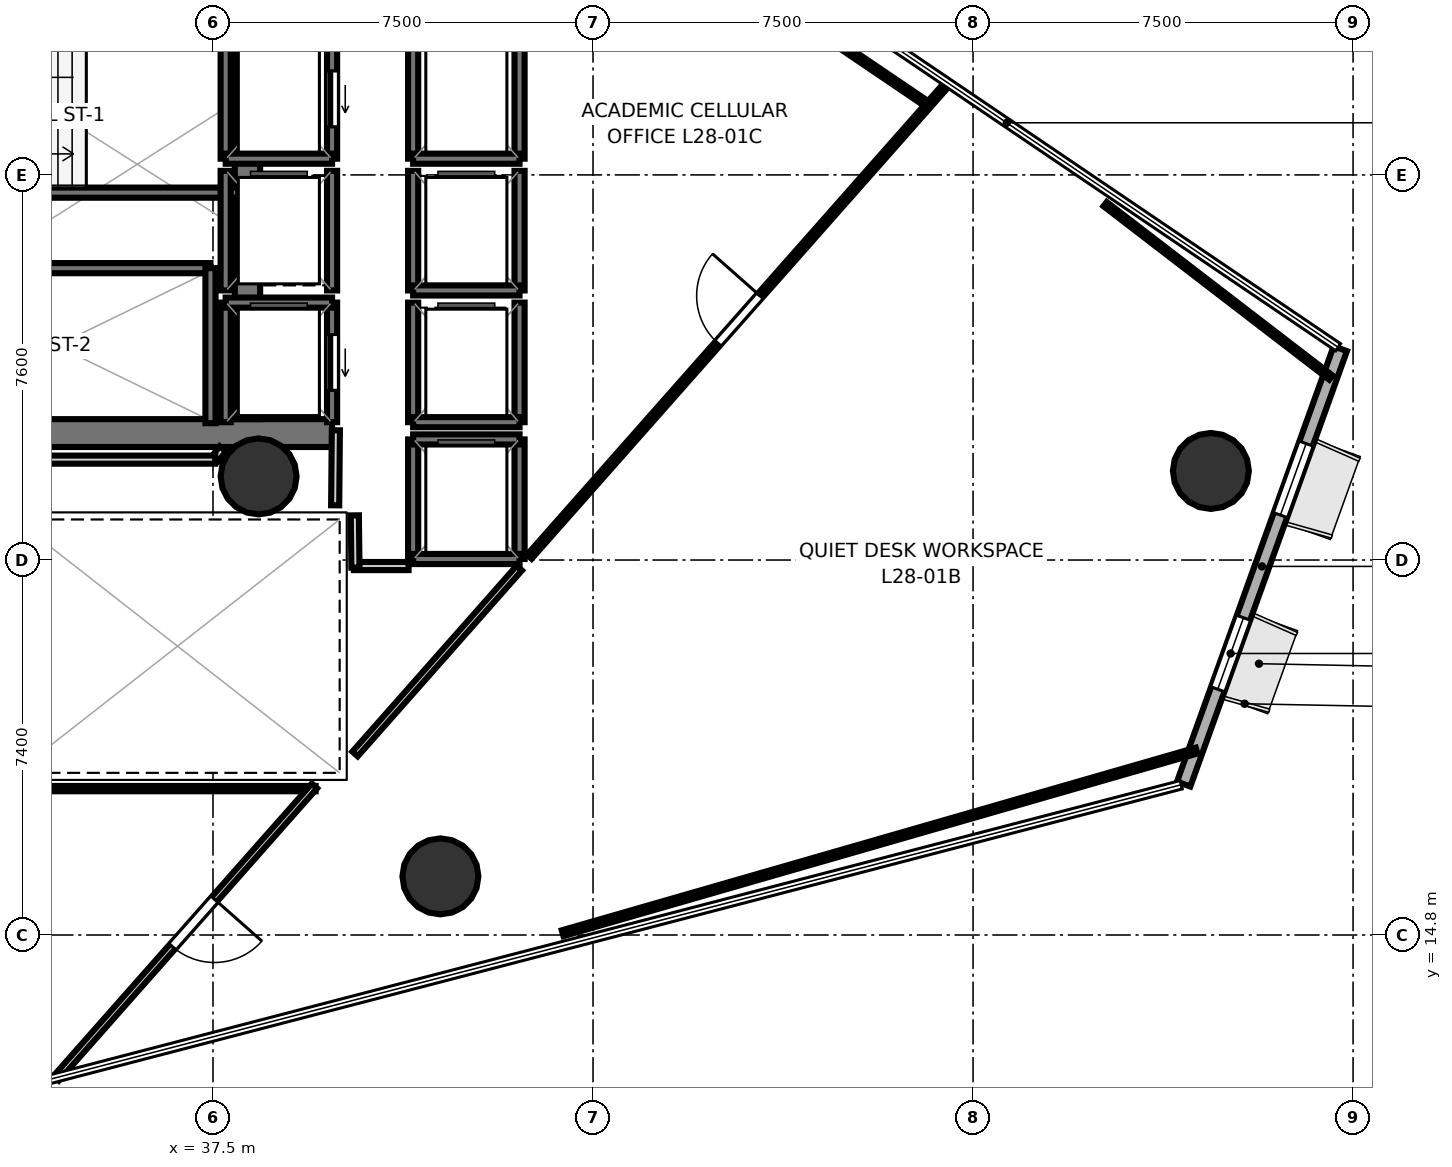
"""IFC4 building model, lengths in metres.
Left out: names, types, materials, properties, quantities, classifications, styles, units other than length and angle.
Written with IfcOpenShell. Run it as: python <this file> out.ifc"""

import sys

from ifc_helpers import new_model, si_unit, direction, frame, frame_2d, origin, origin_2d, place, context, subcontext, project, spatial, rectangle, hollow_circle, extrude, element, fill, save


model = new_model("IFC4")
c1 = context("Model", 3, precision=1e-05, world=origin(), true_north=direction((0.0, 1.0)))
c2 = subcontext(c1, "Body", "Model", "MODEL_VIEW")
j1 = project(units=[si_unit("LENGTHUNIT", "METRE"), si_unit("PLANEANGLEUNIT", "RADIAN")], contexts=[c1])
p1 = place(None, origin())
s1 = spatial("IfcSite", under=j1, at=p1, CompositionType="ELEMENT")
p2 = place(p1, origin())
s2 = spatial("IfcBuilding", under=s1, at=p2, CompositionType="ELEMENT")
p3 = place(p2, frame((0.0, 0.0, 112.6)))
s3 = spatial("IfcBuildingStorey", under=s2, at=p3, CompositionType="ELEMENT", Elevation=112.6)
p4 = place(p3, frame((29.23, 24.705, 0.0), z_axis=(0.0, 0.0, 1.0), x_axis=(1.0, 0.0, 0.0)))
e1 = element("IfcWall", 1, at=p4, inside=s3, PredefinedType="SHEAR", context=c2, shape_type="SweptSolid", body=[
    extrude(rectangle(XDim=10.62, YDim=0.55, at=frame_2d((5.31, 0.0))), origin(), (0.0, 0.0, 1.0), 3.52),
])
p5 = place(p4, frame((0.795, 0.0, 0.0)))
e2 = element("IfcOpeningElement", 2, at=p5, cuts=e1, PredefinedType="OPENING", context=c2, shape_type="SweptSolid", body=[
    extrude(rectangle(XDim=1.25, YDim=2.15, at=frame_2d((0.625, 1.075))), frame((0.0, 0.285, 0.0), z_axis=(0.0, -1.0, 0.0), x_axis=(1.0, 0.0, 0.0)), (0.0, 0.0, 1.0), 0.57),
])
p6 = place(p3, frame((38.18, 24.98, 0.0), z_axis=(0.0, 0.0, 1.0), x_axis=(0.0, 1.0, 0.0)))
e3 = element("IfcWall", 3, at=p6, inside=s3, PredefinedType="SHEAR", context=c2, shape_type="SweptSolid", body=[
    extrude(rectangle(XDim=7.44, YDim=0.5, at=frame_2d((3.72, 0.0))), origin(), (0.0, 0.0, 1.0), 3.52),
])
for number, where, z_axis, x_axis in (
    (4, (38.4, 23.85, 0.0), (0.0, 0.0, 1.0), (1.0, 0.0, 0.0)),
    (5, (57.194, 23.958, 0.0), (0.0, 0.0, 1.0), (1.0, 0.0, 0.0)),
    (6, (41.988, 15.957, 0.0), (0.0, 0.0, 1.0), (1.0, 0.0, 0.0)),
):
    element("IfcColumn", number, at=place(p3, frame(where, z_axis=z_axis, x_axis=x_axis)), inside=s3, PredefinedType="COLUMN", context=c2, shape_type="SweptSolid", body=[
        extrude(hollow_circle(Radius=0.75, WallThickness=0.036, at=origin_2d()), origin(), (0.0, 0.0, 1.0), 3.7),
    ])
p7 = place(p3, frame((56.656, 17.778, 0.0), z_axis=(0.0, 0.0, 1.0), x_axis=(0.338454364394, 0.940982807081, 0.0)))
e7 = element("IfcWall", 7, at=p7, inside=s3, PredefinedType="SOLIDWALL", context=c2, shape_type="SweptSolid", body=[
    extrude(rectangle(XDim=9.131, YDim=0.28, at=frame_2d((4.566, 0.0))), origin(), (0.0, 0.0, 1.0), 3.52),
])
p8 = place(p7, frame((1.99, 0.0, 0.85)))
e8 = element("IfcOpeningElement", 8, at=p8, cuts=e7, PredefinedType="OPENING", context=c2, shape_type="SweptSolid", body=[
    extrude(rectangle(XDim=1.5, YDim=2.1, at=frame_2d((0.75, 1.05))), frame((0.0, 0.15, 0.0), z_axis=(0.0, -1.0, 0.0), x_axis=(1.0, 0.0, 0.0)), (0.0, 0.0, 1.0), 0.3),
])
p9 = place(p7, frame((5.642, 0.0, 0.85)))
e9 = element("IfcOpeningElement", 9, at=p9, cuts=e7, PredefinedType="OPENING", context=c2, shape_type="SweptSolid", body=[
    extrude(rectangle(XDim=1.5, YDim=2.1, at=frame_2d((0.75, 1.05))), frame((0.0, 0.15, 0.0), z_axis=(0.0, -1.0, 0.0), x_axis=(1.0, 0.0, 0.0)), (0.0, 0.0, 1.0), 0.3),
])
p10 = place(p3, frame((29.7, 29.45, 0.0), z_axis=(0.0, 0.0, 1.0), x_axis=(1.0, 0.0, 0.0)))
e10 = element("IfcWall", 10, at=p10, inside=s3, PredefinedType="SOLIDWALL", context=c2, shape_type="SweptSolid", body=[
    extrude(rectangle(XDim=8.3, YDim=0.2, at=frame_2d((4.15, 0.0))), origin(), (0.0, 0.0, 1.0), 3.52),
])
p11 = place(p3, frame((29.7, 27.96, 0.0), z_axis=(0.0, 0.0, 1.0), x_axis=(1.0, 0.0, 0.0)))
e11 = element("IfcWall", 11, at=p11, inside=s3, PredefinedType="SOLIDWALL", context=c2, shape_type="SweptSolid", body=[
    extrude(rectangle(XDim=7.75, YDim=0.2, at=frame_2d((3.875, 0.0))), origin(), (0.0, 0.0, 1.0), 3.52),
])
p12 = place(p3, frame((37.45, 24.9, 0.0), z_axis=(0.0, 0.0, 1.0), x_axis=(0.0, 1.0, 0.0)))
e12 = element("IfcWall", 12, at=p12, inside=s3, PredefinedType="SOLIDWALL", context=c2, shape_type="SweptSolid", body=[
    extrude(rectangle(XDim=3.06, YDim=0.2, at=frame_2d((1.53, 0.0))), origin(), (0.0, 0.0, 1.0), 3.52),
])
p13 = place(p3, frame((39.85, 30.12, 0.0), z_axis=(0.0, 0.0, 1.0), x_axis=(0.0, 1.0, 0.0)))
e13 = element("IfcWall", 13, at=p13, inside=s3, PredefinedType="SOLIDWALL", context=c2, shape_type="SweptSolid", body=[
    extrude(rectangle(XDim=2.36, YDim=0.2, at=frame_2d((1.18, 0.0))), origin(), (0.0, 0.0, 1.0), 3.52),
])
p14 = place(p13, frame((0.63, 0.0, 0.0)))
e14 = element("IfcOpeningElement", 14, at=p14, cuts=e13, PredefinedType="OPENING", context=c2, shape_type="SweptSolid", body=[
    extrude(rectangle(XDim=1.1, YDim=2.15, at=frame_2d((0.55, 1.075))), frame((0.0, 0.11, 0.0), z_axis=(0.0, -1.0, 0.0), x_axis=(1.0, 0.0, 0.0)), (0.0, 0.0, 1.0), 0.22),
])
p15 = place(p3, frame((37.75, 30.12, 0.0), z_axis=(0.0, 0.0, 1.0), x_axis=(0.0, 1.0, 0.0)))
e15 = element("IfcWall", 15, at=p15, inside=s3, PredefinedType="SOLIDWALL", context=c2, shape_type="SweptSolid", body=[
    extrude(rectangle(XDim=2.36, YDim=0.2, at=frame_2d((1.18, 0.0))), origin(), (0.0, 0.0, 1.0), 3.52),
])
p16 = place(p3, frame((37.75, 30.12, 0.0), z_axis=(0.0, 0.0, 1.0), x_axis=(1.0, 0.0, 0.0)))
e16 = element("IfcWall", 16, at=p16, inside=s3, PredefinedType="SOLIDWALL", context=c2, shape_type="SweptSolid", body=[
    extrude(rectangle(XDim=2.1, YDim=0.2, at=frame_2d((1.05, 0.0))), origin(), (0.0, 0.0, 1.0), 3.52),
])
p17 = place(p3, frame((39.85, 24.92, 0.0), z_axis=(0.0, 0.0, 1.0), x_axis=(0.0, 1.0, 0.0)))
e17 = element("IfcWall", 17, at=p17, inside=s3, PredefinedType="SOLIDWALL", context=c2, shape_type="SweptSolid", body=[
    extrude(rectangle(XDim=2.36, YDim=0.2, at=frame_2d((1.18, 0.0))), origin(), (0.0, 0.0, 1.0), 3.52),
])
p18 = place(p17, frame((0.63, 0.0, 0.0)))
e18 = element("IfcOpeningElement", 18, at=p18, cuts=e17, PredefinedType="OPENING", context=c2, shape_type="SweptSolid", body=[
    extrude(rectangle(XDim=1.1, YDim=2.15, at=frame_2d((0.55, 1.075))), frame((0.0, 0.11, 0.0), z_axis=(0.0, -1.0, 0.0), x_axis=(1.0, 0.0, 0.0)), (0.0, 0.0, 1.0), 0.22),
])
p19 = place(p3, frame((37.75, 24.92, 0.0), z_axis=(0.0, 0.0, 1.0), x_axis=(0.0, 1.0, 0.0)))
e19 = element("IfcWall", 19, at=p19, inside=s3, PredefinedType="SOLIDWALL", context=c2, shape_type="SweptSolid", body=[
    extrude(rectangle(XDim=2.36, YDim=0.2, at=frame_2d((1.18, 0.0))), origin(), (0.0, 0.0, 1.0), 3.52),
])
p20 = place(p3, frame((37.75, 27.28, 0.0), z_axis=(0.0, 0.0, 1.0), x_axis=(1.0, 0.0, 0.0)))
e20 = element("IfcWall", 20, at=p20, inside=s3, PredefinedType="SOLIDWALL", context=c2, shape_type="SweptSolid", body=[
    extrude(rectangle(XDim=2.1, YDim=0.2, at=frame_2d((1.05, 0.0))), origin(), (0.0, 0.0, 1.0), 3.52),
])
for number, where, z_axis, x_axis in (
    (21, (43.55, 30.12, 0.0), (0.0, 0.0, 1.0), (0.0, 1.0, 0.0)),
    (22, (41.45, 30.12, 0.0), (0.0, 0.0, 1.0), (0.0, 1.0, 0.0)),
):
    element("IfcWall", number, at=place(p3, frame(where, z_axis=z_axis, x_axis=x_axis)), inside=s3, PredefinedType="SOLIDWALL", context=c2, shape_type="SweptSolid", body=[
        extrude(rectangle(XDim=2.36, YDim=0.2, at=frame_2d((1.18, 0.0))), origin(), (0.0, 0.0, 1.0), 3.52),
    ])
p21 = place(p3, frame((41.45, 30.12, 0.0), z_axis=(0.0, 0.0, 1.0), x_axis=(1.0, 0.0, 0.0)))
e23 = element("IfcWall", 23, at=p21, inside=s3, PredefinedType="SOLIDWALL", context=c2, shape_type="SweptSolid", body=[
    extrude(rectangle(XDim=2.1, YDim=0.2, at=frame_2d((1.05, 0.0))), origin(), (0.0, 0.0, 1.0), 3.52),
])
for number, where, z_axis, x_axis in (
    (24, (43.55, 27.52, 0.0), (0.0, 0.0, 1.0), (0.0, 1.0, 0.0)),
    (25, (41.45, 27.52, 0.0), (0.0, 0.0, 1.0), (0.0, 1.0, 0.0)),
):
    element("IfcWall", number, at=place(p3, frame(where, z_axis=z_axis, x_axis=x_axis)), inside=s3, PredefinedType="SOLIDWALL", context=c2, shape_type="SweptSolid", body=[
        extrude(rectangle(XDim=2.36, YDim=0.2, at=frame_2d((1.18, 0.0))), origin(), (0.0, 0.0, 1.0), 3.52),
    ])
p22 = place(p3, frame((41.45, 27.52, 0.0), z_axis=(0.0, 0.0, 1.0), x_axis=(1.0, 0.0, 0.0)))
e26 = element("IfcWall", 26, at=p22, inside=s3, PredefinedType="SOLIDWALL", context=c2, shape_type="SweptSolid", body=[
    extrude(rectangle(XDim=2.1, YDim=0.2, at=frame_2d((1.05, 0.0))), origin(), (0.0, 0.0, 1.0), 3.52),
])
for number, where, z_axis, x_axis in (
    (27, (43.55, 24.92, 0.0), (0.0, 0.0, 1.0), (0.0, 1.0, 0.0)),
    (28, (41.45, 24.92, 0.0), (0.0, 0.0, 1.0), (0.0, 1.0, 0.0)),
):
    element("IfcWall", number, at=place(p3, frame(where, z_axis=z_axis, x_axis=x_axis)), inside=s3, PredefinedType="SOLIDWALL", context=c2, shape_type="SweptSolid", body=[
        extrude(rectangle(XDim=2.36, YDim=0.2, at=frame_2d((1.18, 0.0))), origin(), (0.0, 0.0, 1.0), 3.52),
    ])
p23 = place(p3, frame((41.45, 24.92, 0.0), z_axis=(0.0, 0.0, 1.0), x_axis=(1.0, 0.0, 0.0)))
e29 = element("IfcWall", 29, at=p23, inside=s3, PredefinedType="SOLIDWALL", context=c2, shape_type="SweptSolid", body=[
    extrude(rectangle(XDim=2.1, YDim=0.2, at=frame_2d((1.05, 0.0))), origin(), (0.0, 0.0, 1.0), 3.52),
])
for number, where, z_axis, x_axis in (
    (30, (39.85, 27.52, 0.0), (0.0, 0.0, 1.0), (0.0, 1.0, 0.0)),
    (31, (37.75, 27.52, 0.0), (0.0, 0.0, 1.0), (0.0, 1.0, 0.0)),
):
    element("IfcWall", number, at=place(p3, frame(where, z_axis=z_axis, x_axis=x_axis)), inside=s3, PredefinedType="SOLIDWALL", context=c2, shape_type="SweptSolid", body=[
        extrude(rectangle(XDim=2.36, YDim=0.2, at=frame_2d((1.18, 0.0))), origin(), (0.0, 0.0, 1.0), 3.52),
    ])
for number, where, z_axis, x_axis in (
    (32, (43.55, 22.22, 0.0), (0.0, 0.0, 1.0), (0.0, 1.0, 0.0)),
    (33, (41.45, 22.22, 0.0), (0.0, 0.0, 1.0), (0.0, 1.0, 0.0)),
):
    element("IfcWall", number, at=place(p3, frame(where, z_axis=z_axis, x_axis=x_axis)), inside=s3, PredefinedType="SOLIDWALL", context=c2, shape_type="SweptSolid", body=[
        extrude(rectangle(XDim=2.36, YDim=0.2, at=frame_2d((1.18, 0.0))), origin(), (0.0, 0.0, 1.0), 3.52),
    ])
for number, where, z_axis, x_axis in (
    (34, (41.45, 24.58, 0.0), (0.0, 0.0, 1.0), (1.0, 0.0, 0.0)),
    (35, (41.45, 22.22, 0.0), (0.0, 0.0, 1.0), (1.0, 0.0, 0.0)),
):
    element("IfcWall", number, at=place(p3, frame(where, z_axis=z_axis, x_axis=x_axis)), inside=s3, PredefinedType="SOLIDWALL", context=c2, shape_type="SweptSolid", body=[
        extrude(rectangle(XDim=2.1, YDim=0.2, at=frame_2d((1.05, 0.0))), origin(), (0.0, 0.0, 1.0), 3.52),
    ])
p24 = place(p3, frame((41.36, 22.081, 0.0), z_axis=(0.0, 0.0, 1.0), x_axis=(-1.0, 0.0, 0.0)))
e36 = element("IfcWall", 36, at=p24, inside=s3, PredefinedType="PARTITIONING", context=c2, shape_type="SweptSolid", body=[
    extrude(rectangle(XDim=1.08, YDim=0.16, at=frame_2d((0.54, 0.0))), origin(), (0.0, 0.0, 1.0), 2.84),
])
p25 = place(p3, frame((40.311, 22.05, 0.0), z_axis=(0.0, 0.0, 1.0), x_axis=(-0.011836292006, 0.999929948642, 0.0)))
e37 = element("IfcWall", 37, at=p25, inside=s3, PredefinedType="PARTITIONING", context=c2, shape_type="SweptSolid", body=[
    extrude(rectangle(XDim=1.031, YDim=0.16, at=frame_2d((0.516, 0.0))), origin(), (0.0, 0.0, 1.0), 2.84),
])
p26 = place(p3, frame((39.911, 23.28, 0.0), z_axis=(0.0, 0.0, 1.0), x_axis=(0.009397771291, 0.999955839972, 0.0)))
e38 = element("IfcWall", 38, at=p26, inside=s3, PredefinedType="PARTITIONING", context=c2, shape_type="SweptSolid", body=[
    extrude(rectangle(XDim=1.481, YDim=0.16, at=frame_2d((0.74, 0.0))), origin(), (0.0, 0.0, 1.0), 2.84),
])
p27 = place(p3, frame((37.694, 24.396, 0.0), z_axis=(0.0, 0.0, 1.0), x_axis=(-0.607118658061, -0.794611184815, 0.0)))
e39 = element("IfcWall", 39, at=p27, inside=s3, PredefinedType="PARTITIONING", context=c2, shape_type="SweptSolid", body=[
    extrude(rectangle(XDim=0.246, YDim=0.16, at=frame_2d((0.123, 0.0))), origin(), (0.0, 0.0, 1.0), 2.84),
])
p28 = place(p3, frame((37.545, 24.181, 0.0), z_axis=(0.0, 0.0, 1.0), x_axis=(-1.0, 0.0, 0.0)))
e40 = element("IfcWall", 40, at=p28, inside=s3, PredefinedType="PARTITIONING", context=c2, shape_type="SweptSolid", body=[
    extrude(rectangle(XDim=4.015, YDim=0.16, at=frame_2d((2.007, 0.0))), origin(), (0.0, 0.0, 1.0), 2.84),
])
p29 = place(p3, frame((33.6, 17.689, 0.0), z_axis=(0.0, 0.0, 1.0), x_axis=(1.0, 0.0, 0.0)))
e41 = element("IfcWall", 41, at=p29, inside=s3, PredefinedType="PARTITIONING", context=c2, shape_type="SweptSolid", body=[
    extrude(rectangle(XDim=5.925, YDim=0.105, at=frame_2d((2.962, 0.0))), origin(), (0.0, 0.0, 1.0), 2.84),
])
p30 = place(p3, frame((39.502, 17.74, 0.0), z_axis=(0.0, 0.0, 1.0), x_axis=(-0.662230930848, -0.749299802635, 0.0)))
e42 = element("IfcWall", 42, at=p30, inside=s3, PredefinedType="PARTITIONING", context=c2, shape_type="SweptSolid", body=[
    extrude(rectangle(XDim=7.697, YDim=0.14, at=frame_2d((3.849, 0.0))), origin(), (0.0, 0.0, 1.0), 2.84),
])
p31 = place(p30, frame((2.98, 0.0, 0.0)))
e43 = element("IfcOpeningElement", 43, at=p31, cuts=e42, PredefinedType="OPENING", context=c2, shape_type="SweptSolid", body=[
    extrude(rectangle(XDim=1.25, YDim=2.2, at=frame_2d((0.625, 1.1))), frame((0.0, 0.08, 0.0), z_axis=(0.0, -1.0, 0.0), x_axis=(1.0, 0.0, 0.0)), (0.0, 0.0, 1.0), 0.16),
])
p32 = place(p3, frame((40.303, 18.372, 0.0), z_axis=(0.0, 0.0, 1.0), x_axis=(0.662221894186, 0.749307789136, 0.0)))
e44 = element("IfcWall", 44, at=p32, inside=s3, PredefinedType="PARTITIONING", context=c2, shape_type="SweptSolid", body=[
    extrude(rectangle(XDim=4.895, YDim=0.14, at=frame_2d((2.447, 0.0))), origin(), (0.0, 0.0, 1.0), 2.84),
])
p33 = place(p3, frame((43.743, 22.264, 0.0), z_axis=(0.0, 0.0, 1.0), x_axis=(0.662202897959, 0.749324577159, 0.0)))
e45 = element("IfcWall", 45, at=p33, inside=s3, PredefinedType="PARTITIONING", context=c2, shape_type="SweptSolid", body=[
    extrude(rectangle(XDim=12.498, YDim=0.12, at=frame_2d((6.249, 0.0))), origin(), (0.0, 0.0, 1.0), 2.84),
])
p34 = place(p33, frame((5.624, 0.0, 0.0)))
e46 = element("IfcOpeningElement", 46, at=p34, cuts=e45, PredefinedType="OPENING", context=c2, shape_type="SweptSolid", body=[
    extrude(rectangle(XDim=1.25, YDim=2.2, at=frame_2d((0.625, 1.1))), frame((0.0, 0.07, 0.0), z_axis=(0.0, -1.0, 0.0), x_axis=(1.0, 0.0, 0.0)), (0.0, 0.0, 1.0), 0.14),
])
p35 = place(p3, frame((55.106, 29.224, 0.0), z_axis=(0.0, 0.0, 1.0), x_axis=(0.792945217065, -0.609292936717, 0.0)))
e47 = element("IfcWall", 47, at=p35, inside=s3, PredefinedType="PARTITIONING", context=c2, shape_type="SweptSolid", body=[
    extrude(rectangle(XDim=5.621, YDim=0.105, at=frame_2d((2.81, 0.0))), origin(), (0.0, 0.0, 1.0), 2.84),
])
p36 = place(p3, frame((56.912, 18.439, 0.0), z_axis=(0.0, 0.0, 1.0), x_axis=(-0.960917353676, -0.276835401285, 0.0)))
e48 = element("IfcWall", 48, at=p36, inside=s3, PredefinedType="PARTITIONING", context=c2, shape_type="SweptSolid", body=[
    extrude(rectangle(XDim=13.02, YDim=0.12, at=frame_2d((6.51, 0.0))), origin(), (0.0, 0.0, 1.0), 2.84),
])
p37 = place(p3, frame((41.65, 37.933, 0.0), z_axis=(0.0, 0.0, 1.0), x_axis=(0.827941747022, -0.560814107827, 0.0)))
e49 = element("IfcWall", 49, at=p37, inside=s3, PredefinedType="PARTITIONING", context=c2, shape_type="SweptSolid", body=[
    extrude(rectangle(XDim=11.895, YDim=0.12, at=frame_2d((5.948, 0.0))), origin(), (0.0, 0.0, 1.0), 2.095),
])
p38 = place(p14, origin())
e50 = element("IfcDoor", 50, at=p38, inside=s3, OperationType="SLIDING_TO_LEFT", PredefinedType="DOOR", context=c2, shape_type="SweptSolid", body=[
    extrude(rectangle(XDim=1.1, YDim=2.15, at=frame_2d((0.55, 1.075))), frame((0.0, 0.025, 0.0), z_axis=(0.0, -1.0, 0.0), x_axis=(1.0, 0.0, 0.0)), (0.0, 0.0, 1.0), 0.05),
])
fill(e14, e50)
p39 = place(p18, origin())
e51 = element("IfcDoor", 51, at=p39, inside=s3, OperationType="SLIDING_TO_LEFT", PredefinedType="DOOR", context=c2, shape_type="SweptSolid", body=[
    extrude(rectangle(XDim=1.1, YDim=2.15, at=frame_2d((0.55, 1.075))), frame((0.0, 0.025, 0.0), z_axis=(0.0, -1.0, 0.0), x_axis=(1.0, 0.0, 0.0)), (0.0, 0.0, 1.0), 0.05),
])
fill(e18, e51)
p40 = place(p31, origin())
e52 = element("IfcDoor", 52, at=p40, inside=s3, OperationType="SINGLE_SWING_LEFT", PredefinedType="DOOR", context=c2, shape_type="SweptSolid", body=[
    extrude(rectangle(XDim=1.25, YDim=2.2, at=frame_2d((0.625, 1.1))), frame((0.0, 0.025, 0.0), z_axis=(0.0, -1.0, 0.0), x_axis=(1.0, 0.0, 0.0)), (0.0, 0.0, 1.0), 0.05),
])
fill(e43, e52)
p41 = place(p34, origin())
e53 = element("IfcDoor", 53, at=p41, inside=s3, OperationType="SINGLE_SWING_RIGHT", PredefinedType="DOOR", context=c2, shape_type="SweptSolid", body=[
    extrude(rectangle(XDim=1.25, YDim=2.2, at=frame_2d((0.625, 1.1))), frame((0.0, 0.025, 0.0), z_axis=(0.0, -1.0, 0.0), x_axis=(1.0, 0.0, 0.0)), (0.0, 0.0, 1.0), 0.05),
])
fill(e46, e53)
p42 = place(p8, origin())
e54 = element("IfcWindow", 54, at=p42, inside=s3, PartitioningType="SINGLE_PANEL", PredefinedType="WINDOW", context=c2, shape_type="SweptSolid", body=[
    extrude(rectangle(XDim=1.5, YDim=2.1, at=frame_2d((0.75, 1.05))), frame((0.0, 0.03, 0.0), z_axis=(0.0, -1.0, 0.0), x_axis=(1.0, 0.0, 0.0)), (0.0, 0.0, 1.0), 0.06),
])
fill(e8, e54)
p43 = place(p9, origin())
e55 = element("IfcWindow", 55, at=p43, inside=s3, PartitioningType="SINGLE_PANEL", PredefinedType="WINDOW", context=c2, shape_type="SweptSolid", body=[
    extrude(rectangle(XDim=1.5, YDim=2.1, at=frame_2d((0.75, 1.05))), frame((0.0, 0.03, 0.0), z_axis=(0.0, -1.0, 0.0), x_axis=(1.0, 0.0, 0.0)), (0.0, 0.0, 1.0), 0.06),
])
fill(e9, e55)
save(model, sys.argv[1])
